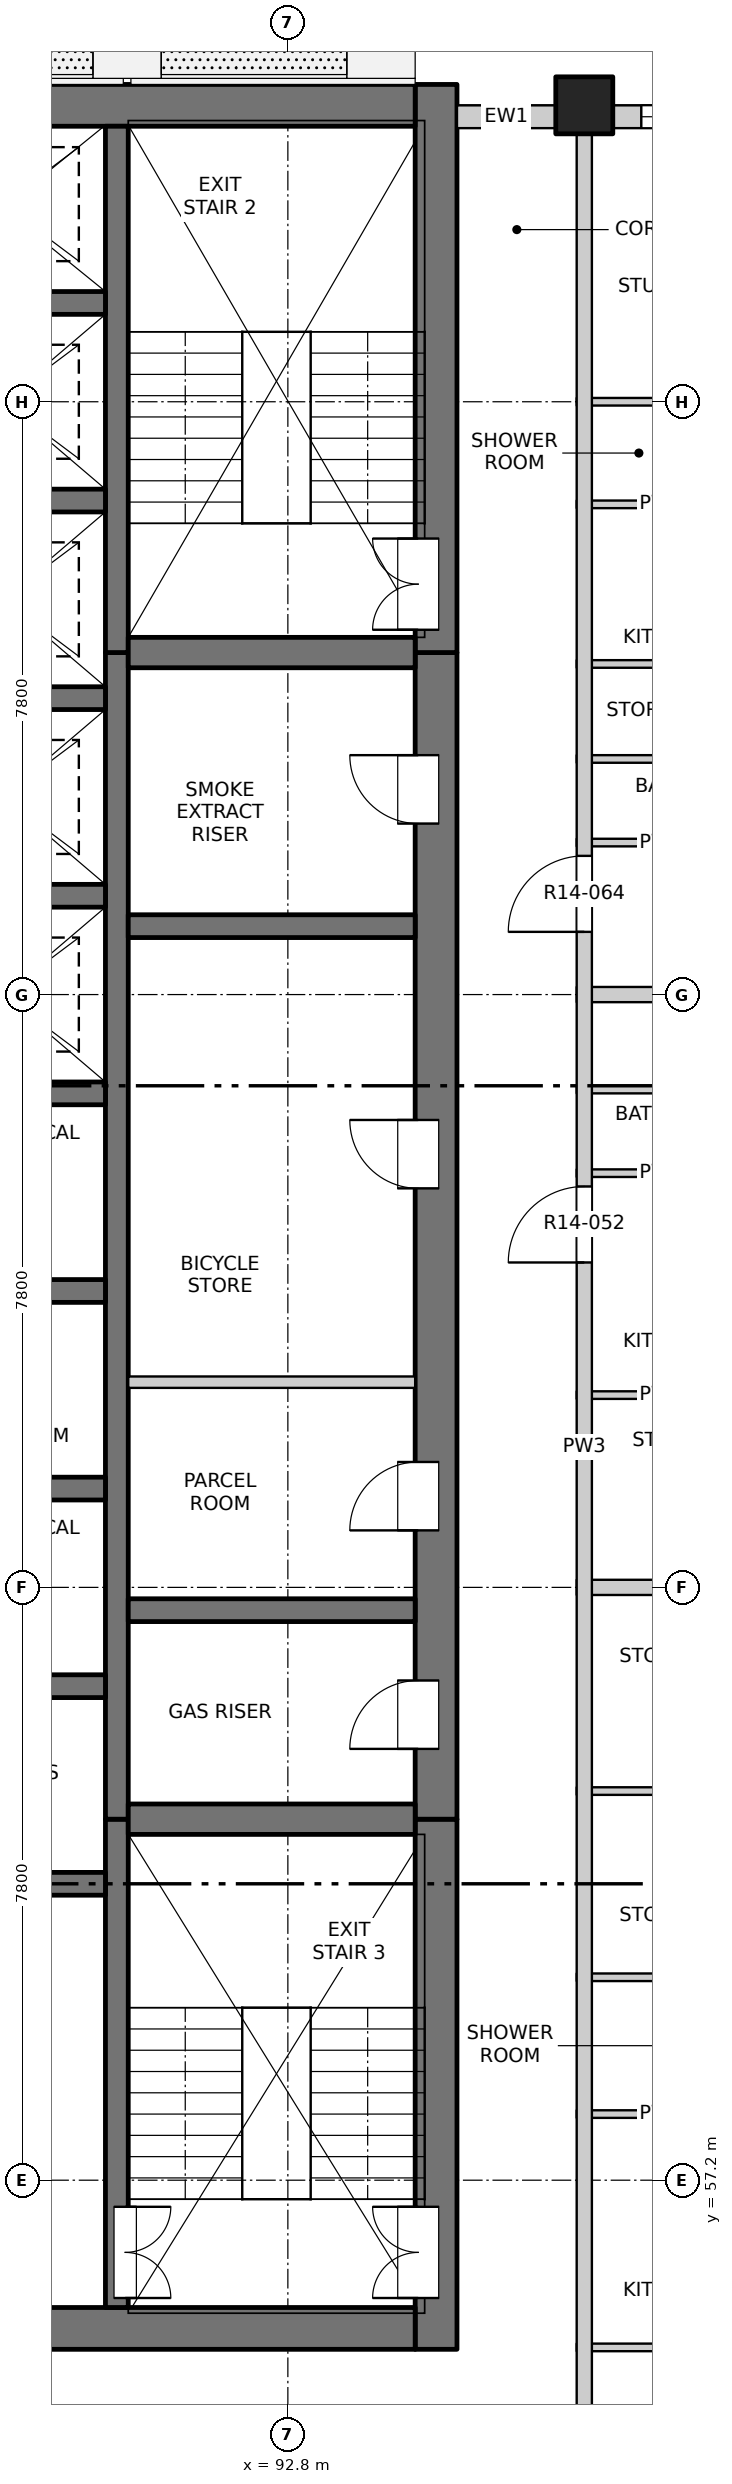
"""IFC4 building model, lengths in metres.
Left out: names, types, materials, properties, quantities, classifications, styles, units other than length and angle.
Written with IfcOpenShell. Run it as: python <this file> out.ifc"""

import sys

from ifc_helpers import new_model, si_unit, direction, frame, frame_2d, origin, origin_2d, place, context, subcontext, project, spatial, rectangle, extrude, element, fill, save


model = new_model("IFC4")
c1 = context("Model", 3, precision=1e-05, world=origin(), true_north=direction((0.0, 1.0)))
c2 = subcontext(c1, "Body", "Model", "MODEL_VIEW")
j1 = project(units=[si_unit("LENGTHUNIT", "METRE"), si_unit("PLANEANGLEUNIT", "RADIAN")], contexts=[c1])
p1 = place(None, origin())
s1 = spatial("IfcSite", under=j1, at=p1, CompositionType="ELEMENT")
p2 = place(p1, origin())
s2 = spatial("IfcBuilding", under=s1, at=p2, CompositionType="ELEMENT")
p3 = place(p2, frame((0.0, 0.0, 148.6)))
s3 = spatial("IfcBuildingStorey", under=s2, at=p3, CompositionType="ELEMENT", Elevation=148.6)
p4 = place(p3, frame((96.7, 84.5, -0.3), z_axis=(0.0, 0.0, 1.0), x_axis=(1.0, 0.0, 0.0)))
e1 = element("IfcColumn", 1, at=p4, inside=s3, PredefinedType="COLUMN", context=c2, shape_type="SweptSolid", body=[
    extrude(rectangle(XDim=0.75, YDim=0.75, at=origin_2d()), origin(), (0.0, 0.0, 1.0), 3.45),
])
p5 = place(p3, frame((94.75, 54.975, -0.3), z_axis=(0.0, 0.0, 1.0), x_axis=(0.0, 1.0, 0.0)))
e2 = element("IfcWall", 2, at=p5, inside=s3, PredefinedType="SOLIDWALL", context=c2, shape_type="SweptSolid", body=[
    extrude(rectangle(XDim=6.975, YDim=0.55, at=frame_2d((3.487, 0.0))), origin(), (0.0, 0.0, 1.0), 3.45),
])
p6 = place(p5, frame((0.675, 0.0, 0.3)))
e3 = element("IfcOpeningElement", 3, at=p6, cuts=e2, PredefinedType="OPENING", context=c2, shape_type="SweptSolid", body=[
    extrude(rectangle(XDim=1.2, YDim=2.1, at=frame_2d((0.6, 1.05))), frame((0.0, 0.285, 0.0), z_axis=(0.0, -1.0, 0.0), x_axis=(1.0, 0.0, 0.0)), (0.0, 0.0, 1.0), 0.57),
])
p7 = place(p3, frame((94.75, 61.95, -0.3), z_axis=(0.0, 0.0, 1.0), x_axis=(0.0, 1.0, 0.0)))
e4 = element("IfcWall", 4, at=p7, inside=s3, PredefinedType="SOLIDWALL", context=c2, shape_type="SweptSolid", body=[
    extrude(rectangle(XDim=15.35, YDim=0.55, at=frame_2d((7.675, 0.0))), origin(), (0.0, 0.0, 1.0), 3.45),
])
p8 = place(p7, frame((0.925, 0.0, 0.3)))
e5 = element("IfcOpeningElement", 5, at=p8, cuts=e4, PredefinedType="OPENING", context=c2, shape_type="SweptSolid", body=[
    extrude(rectangle(XDim=0.9, YDim=2.1, at=frame_2d((0.45, 1.05))), frame((0.0, 0.285, 0.0), z_axis=(0.0, -1.0, 0.0), x_axis=(1.0, 0.0, 0.0)), (0.0, 0.0, 1.0), 0.57),
])
p9 = place(p7, frame((3.8, 0.0, 0.3)))
e6 = element("IfcOpeningElement", 6, at=p9, cuts=e4, PredefinedType="OPENING", context=c2, shape_type="SweptSolid", body=[
    extrude(rectangle(XDim=0.9, YDim=2.1, at=frame_2d((0.45, 1.05))), frame((0.0, 0.285, 0.0), z_axis=(0.0, -1.0, 0.0), x_axis=(1.0, 0.0, 0.0)), (0.0, 0.0, 1.0), 0.57),
])
p10 = place(p7, frame((8.3, 0.0, 0.3)))
e7 = element("IfcOpeningElement", 7, at=p10, cuts=e4, PredefinedType="OPENING", context=c2, shape_type="SweptSolid", body=[
    extrude(rectangle(XDim=0.9, YDim=2.1, at=frame_2d((0.45, 1.05))), frame((0.0, 0.285, 0.0), z_axis=(0.0, -1.0, 0.0), x_axis=(1.0, 0.0, 0.0)), (0.0, 0.0, 1.0), 0.57),
])
p11 = place(p7, frame((13.1, 0.0, 0.3)))
e8 = element("IfcOpeningElement", 8, at=p11, cuts=e4, PredefinedType="OPENING", context=c2, shape_type="SweptSolid", body=[
    extrude(rectangle(XDim=0.9, YDim=2.1, at=frame_2d((0.45, 1.05))), frame((0.0, 0.285, 0.0), z_axis=(0.0, -1.0, 0.0), x_axis=(1.0, 0.0, 0.0)), (0.0, 0.0, 1.0), 0.57),
])
p12 = place(p3, frame((94.75, 77.3, -0.3), z_axis=(0.0, 0.0, 1.0), x_axis=(0.0, 1.0, 0.0)))
e9 = element("IfcWall", 9, at=p12, inside=s3, PredefinedType="SOLIDWALL", context=c2, shape_type="SweptSolid", body=[
    extrude(rectangle(XDim=7.475, YDim=0.55, at=frame_2d((3.737, 0.0))), origin(), (0.0, 0.0, 1.0), 3.45),
])
p13 = place(p12, frame((0.3, 0.0, 0.3)))
e10 = element("IfcOpeningElement", 10, at=p13, cuts=e9, PredefinedType="OPENING", context=c2, shape_type="SweptSolid", body=[
    extrude(rectangle(XDim=1.2, YDim=2.1, at=frame_2d((0.6, 1.05))), frame((0.0, 0.285, 0.0), z_axis=(0.0, -1.0, 0.0), x_axis=(1.0, 0.0, 0.0)), (0.0, 0.0, 1.0), 0.57),
])
p14 = place(p3, frame((75.525, 55.25, -0.3), z_axis=(0.0, 0.0, 1.0), x_axis=(1.0, 0.0, 0.0)))
e11 = element("IfcWall", 11, at=p14, inside=s3, PredefinedType="SOLIDWALL", context=c2, shape_type="SweptSolid", body=[
    extrude(rectangle(XDim=18.95, YDim=0.55, at=frame_2d((9.475, 0.0))), origin(), (0.0, 0.0, 1.0), 3.45),
])
p15 = place(p14, frame((8.725, 0.0, 0.3)))
e12 = element("IfcOpeningElement", 12, at=p15, cuts=e11, PredefinedType="OPENING", context=c2, shape_type="SweptSolid", body=[
    extrude(rectangle(XDim=1.5, YDim=2.1, at=frame_2d((0.75, 1.05))), frame((0.0, 0.285, 0.0), z_axis=(0.0, -1.0, 0.0), x_axis=(1.0, 0.0, 0.0)), (0.0, 0.0, 1.0), 0.57),
])
p16 = place(p3, frame((75.525, 84.5, -0.3), z_axis=(0.0, 0.0, 1.0), x_axis=(1.0, 0.0, 0.0)))
e13 = element("IfcWall", 13, at=p16, inside=s3, PredefinedType="SOLIDWALL", context=c2, shape_type="SweptSolid", body=[
    extrude(rectangle(XDim=18.95, YDim=0.55, at=frame_2d((9.475, 0.0))), origin(), (0.0, 0.0, 1.0), 3.45),
])
p17 = place(p3, frame((90.55, 55.525, -0.3), z_axis=(0.0, 0.0, 1.0), x_axis=(0.0, 1.0, 0.0)))
e14 = element("IfcWall", 14, at=p17, inside=s3, PredefinedType="SOLIDWALL", context=c2, shape_type="SweptSolid", body=[
    extrude(rectangle(XDim=6.425, YDim=0.3, at=frame_2d((3.212, 0.0))), origin(), (0.0, 0.0, 1.0), 3.45),
])
p18 = place(p17, frame((0.125, 0.0, 0.3)))
e15 = element("IfcOpeningElement", 15, at=p18, cuts=e14, PredefinedType="OPENING", context=c2, shape_type="SweptSolid", body=[
    extrude(rectangle(XDim=1.2, YDim=2.1, at=frame_2d((0.6, 1.05))), frame((0.0, 0.16, 0.0), z_axis=(0.0, -1.0, 0.0), x_axis=(1.0, 0.0, 0.0)), (0.0, 0.0, 1.0), 0.32),
])
p19 = place(p3, frame((90.55, 61.95, -0.3), z_axis=(0.0, 0.0, 1.0), x_axis=(0.0, 1.0, 0.0)))
e16 = element("IfcWall", 16, at=p19, inside=s3, PredefinedType="SOLIDWALL", context=c2, shape_type="SweptSolid", body=[
    extrude(rectangle(XDim=15.35, YDim=0.3, at=frame_2d((7.675, 0.0))), origin(), (0.0, 0.0, 1.0), 3.45),
])
p20 = place(p3, frame((90.55, 77.3, -0.3), z_axis=(0.0, 0.0, 1.0), x_axis=(0.0, 1.0, 0.0)))
e17 = element("IfcWall", 17, at=p20, inside=s3, PredefinedType="SOLIDWALL", context=c2, shape_type="SweptSolid", body=[
    extrude(rectangle(XDim=6.925, YDim=0.3, at=frame_2d((3.462, 0.0))), origin(), (0.0, 0.0, 1.0), 3.45),
])
for number, where, z_axis, x_axis in (
    (18, (87.4, 61.1, -0.3), (0.0, 0.0, 1.0), (1.0, 0.0, 0.0)),
    (19, (87.4, 63.7, -0.3), (0.0, 0.0, 1.0), (1.0, 0.0, 0.0)),
    (20, (87.4, 66.3, -0.3), (0.0, 0.0, 1.0), (1.0, 0.0, 0.0)),
    (21, (87.4, 68.9, -0.3), (0.0, 0.0, 1.0), (1.0, 0.0, 0.0)),
    (22, (87.4, 71.5, -0.3), (0.0, 0.0, 1.0), (1.0, 0.0, 0.0)),
    (23, (87.4, 74.1, -0.3), (0.0, 0.0, 1.0), (1.0, 0.0, 0.0)),
    (24, (87.4, 76.7, -0.3), (0.0, 0.0, 1.0), (1.0, 0.0, 0.0)),
    (25, (87.4, 79.3, -0.3), (0.0, 0.0, 1.0), (1.0, 0.0, 0.0)),
    (26, (87.4, 81.9, -0.3), (0.0, 0.0, 1.0), (1.0, 0.0, 0.0)),
):
    element("IfcWall", number, at=place(p3, frame(where, z_axis=z_axis, x_axis=x_axis)), inside=s3, PredefinedType="SOLIDWALL", context=c2, shape_type="SweptSolid", body=[
        extrude(rectangle(XDim=3.0, YDim=0.3, at=frame_2d((1.5, 0.0))), origin(), (0.0, 0.0, 1.0), 3.45),
    ])
p21 = place(p3, frame((90.7, 61.95, -0.3), z_axis=(0.0, 0.0, 1.0), x_axis=(1.0, 0.0, 0.0)))
e27 = element("IfcWall", 27, at=p21, inside=s3, PredefinedType="SOLIDWALL", context=c2, shape_type="SweptSolid", body=[
    extrude(rectangle(XDim=3.775, YDim=0.4, at=frame_2d((1.888, 0.0))), origin(), (0.0, 0.0, 1.0), 3.45),
])
for number, where, z_axis, x_axis in (
    (28, (90.7, 64.7, -0.3), (0.0, 0.0, 1.0), (1.0, 0.0, 0.0)),
    (29, (90.7, 73.7, -0.3), (0.0, 0.0, 1.0), (1.0, 0.0, 0.0)),
):
    element("IfcWall", number, at=place(p3, frame(where, z_axis=z_axis, x_axis=x_axis)), inside=s3, PredefinedType="SOLIDWALL", context=c2, shape_type="SweptSolid", body=[
        extrude(rectangle(XDim=3.775, YDim=0.3, at=frame_2d((1.888, 0.0))), origin(), (0.0, 0.0, 1.0), 3.45),
    ])
p22 = place(p3, frame((90.7, 77.3, -0.3), z_axis=(0.0, 0.0, 1.0), x_axis=(1.0, 0.0, 0.0)))
e30 = element("IfcWall", 30, at=p22, inside=s3, PredefinedType="SOLIDWALL", context=c2, shape_type="SweptSolid", body=[
    extrude(rectangle(XDim=3.775, YDim=0.4, at=frame_2d((1.888, 0.0))), origin(), (0.0, 0.0, 1.0), 3.45),
])
p23 = place(p3, frame((95.025, 84.35, 0.0), z_axis=(0.0, 0.0, 1.0), x_axis=(1.0, 0.0, 0.0)))
e31 = element("IfcWall", 31, at=p23, inside=s3, PredefinedType="SOLIDWALL", context=c2, shape_type="SweptSolid", body=[
    extrude(rectangle(XDim=1.3, YDim=0.3, at=frame_2d((0.65, 0.0))), origin(), (0.0, 0.0, 1.0), 2.7),
])
p24 = place(p3, frame((97.075, 84.35, 0.0), z_axis=(0.0, 0.0, 1.0), x_axis=(1.0, 0.0, 0.0)))
e32 = element("IfcWall", 32, at=p24, inside=s3, PredefinedType="SOLIDWALL", context=c2, shape_type="SweptSolid", body=[
    extrude(rectangle(XDim=3.525, YDim=0.3, at=frame_2d((1.763, 0.0))), origin(), (0.0, 0.0, 1.0), 2.7),
])
p25 = place(p24, frame((0.375, 0.0, 0.9)))
e33 = element("IfcOpeningElement", 33, at=p25, cuts=e32, PredefinedType="OPENING", context=c2, shape_type="SweptSolid", body=[
    extrude(rectangle(XDim=2.4, YDim=1.8, at=frame_2d((1.2, 0.9))), frame((0.0, 0.16, 0.0), z_axis=(0.0, -1.0, 0.0), x_axis=(1.0, 0.0, 0.0)), (0.0, 0.0, 1.0), 0.32),
])
for number, where, z_axis, x_axis in (
    (34, (96.6, 55.0, 0.0), (0.0, 0.0, 1.0), (1.0, 0.0, 0.0)),
    (35, (96.6, 58.07, 0.0), (0.0, 0.0, 1.0), (1.0, 0.0, 0.0)),
    (36, (96.6, 59.87, 0.0), (0.0, 0.0, 1.0), (1.0, 0.0, 0.0)),
    (37, (96.6, 62.32, 0.0), (0.0, 0.0, 1.0), (1.0, 0.0, 0.0)),
):
    element("IfcWall", number, at=place(p3, frame(where, z_axis=z_axis, x_axis=x_axis)), inside=s3, PredefinedType="PARTITIONING", context=c2, shape_type="SweptSolid", body=[
        extrude(rectangle(XDim=2.22, YDim=0.1, at=frame_2d((1.11, 0.0))), origin(), (0.0, 0.0, 1.0), 3.15),
    ])
p26 = place(p3, frame((96.6, 65.0, 0.0), z_axis=(0.0, 0.0, 1.0), x_axis=(1.0, 0.0, 0.0)))
e38 = element("IfcWall", 38, at=p26, inside=s3, PredefinedType="PARTITIONING", context=c2, shape_type="SweptSolid", body=[
    extrude(rectangle(XDim=7.6, YDim=0.2, at=frame_2d((3.8, 0.0))), origin(), (0.0, 0.0, 1.0), 3.15),
])
p27 = place(p3, frame((96.6, 67.53, 0.0), z_axis=(0.0, 0.0, 1.0), x_axis=(1.0, 0.0, 0.0)))
e39 = element("IfcWall", 39, at=p27, inside=s3, PredefinedType="PARTITIONING", context=c2, shape_type="SweptSolid", body=[
    extrude(rectangle(XDim=2.22, YDim=0.1, at=frame_2d((1.11, 0.0))), origin(), (0.0, 0.0, 1.0), 3.15),
])
p28 = place(p3, frame((90.7, 67.7, 0.0), z_axis=(0.0, 0.0, 1.0), x_axis=(1.0, 0.0, 0.0)))
e40 = element("IfcWall", 40, at=p28, inside=s3, PredefinedType="PARTITIONING", context=c2, shape_type="SweptSolid", body=[
    extrude(rectangle(XDim=3.775, YDim=0.15, at=frame_2d((1.887, 0.0))), origin(), (0.0, 0.0, 1.0), 3.15),
])
for number, where, z_axis, x_axis in (
    (41, (96.6, 70.45, 0.0), (0.0, 0.0, 1.0), (1.0, 0.0, 0.0)),
    (42, (96.6, 71.55, 0.0), (0.0, 0.0, 1.0), (1.0, 0.0, 0.0)),
):
    element("IfcWall", number, at=place(p3, frame(where, z_axis=z_axis, x_axis=x_axis)), inside=s3, PredefinedType="PARTITIONING", context=c2, shape_type="SweptSolid", body=[
        extrude(rectangle(XDim=2.22, YDim=0.1, at=frame_2d((1.11, 0.0))), origin(), (0.0, 0.0, 1.0), 3.15),
    ])
p29 = place(p3, frame((96.6, 72.8, 0.0), z_axis=(0.0, 0.0, 1.0), x_axis=(1.0, 0.0, 0.0)))
e43 = element("IfcWall", 43, at=p29, inside=s3, PredefinedType="PARTITIONING", context=c2, shape_type="SweptSolid", body=[
    extrude(rectangle(XDim=7.6, YDim=0.2, at=frame_2d((3.8, 0.0))), origin(), (0.0, 0.0, 1.0), 3.15),
])
for number, where, z_axis, x_axis in (
    (44, (96.6, 74.8, 0.0), (0.0, 0.0, 1.0), (1.0, 0.0, 0.0)),
    (45, (96.6, 75.9, 0.0), (0.0, 0.0, 1.0), (1.0, 0.0, 0.0)),
    (46, (96.6, 77.15, 0.0), (0.0, 0.0, 1.0), (1.0, 0.0, 0.0)),
    (47, (96.6, 79.25, 0.0), (0.0, 0.0, 1.0), (1.0, 0.0, 0.0)),
):
    element("IfcWall", number, at=place(p3, frame(where, z_axis=z_axis, x_axis=x_axis)), inside=s3, PredefinedType="PARTITIONING", context=c2, shape_type="SweptSolid", body=[
        extrude(rectangle(XDim=2.22, YDim=0.1, at=frame_2d((1.11, 0.0))), origin(), (0.0, 0.0, 1.0), 3.15),
    ])
p30 = place(p3, frame((96.6, 80.6, 0.0), z_axis=(0.0, 0.0, 1.0), x_axis=(1.0, 0.0, 0.0)))
e48 = element("IfcWall", 48, at=p30, inside=s3, PredefinedType="PARTITIONING", context=c2, shape_type="SweptSolid", body=[
    extrude(rectangle(XDim=7.6, YDim=0.1, at=frame_2d((3.8, 0.0))), origin(), (0.0, 0.0, 1.0), 3.15),
])
p31 = place(p30, frame((2.56, 0.0, 0.0)))
e49 = element("IfcOpeningElement", 49, at=p31, cuts=e48, PredefinedType="OPENING", context=c2, shape_type="SweptSolid", body=[
    extrude(rectangle(XDim=0.9, YDim=2.1, at=frame_2d((0.45, 1.05))), frame((0.0, 0.06, 0.0), z_axis=(0.0, -1.0, 0.0), x_axis=(1.0, 0.0, 0.0)), (0.0, 0.0, 1.0), 0.12),
])
p32 = place(p3, frame((96.7, 49.5, 0.0), z_axis=(0.0, 0.0, 1.0), x_axis=(0.0, 1.0, 0.0)))
e50 = element("IfcWall", 50, at=p32, inside=s3, PredefinedType="PARTITIONING", context=c2, shape_type="SweptSolid", body=[
    extrude(rectangle(XDim=34.7, YDim=0.2, at=frame_2d((17.35, 0.0))), origin(), (0.0, 0.0, 1.0), 3.15),
])
p33 = place(p32, frame((3.225, 0.0, 0.0)))
e51 = element("IfcOpeningElement", 51, at=p33, cuts=e50, PredefinedType="OPENING", context=c2, shape_type="SweptSolid", body=[
    extrude(rectangle(XDim=1.0, YDim=2.1, at=frame_2d((0.5, 1.05))), frame((0.0, 0.11, 0.0), z_axis=(0.0, -1.0, 0.0), x_axis=(1.0, 0.0, 0.0)), (0.0, 0.0, 1.0), 0.22),
])
p34 = place(p32, frame((19.775, 0.0, 0.0)))
e52 = element("IfcOpeningElement", 52, at=p34, cuts=e50, PredefinedType="OPENING", context=c2, shape_type="SweptSolid", body=[
    extrude(rectangle(XDim=1.0, YDim=2.1, at=frame_2d((0.5, 1.05))), frame((0.0, 0.11, 0.0), z_axis=(0.0, -1.0, 0.0), x_axis=(1.0, 0.0, 0.0)), (0.0, 0.0, 1.0), 0.22),
])
p35 = place(p32, frame((24.125, 0.0, 0.0)))
e53 = element("IfcOpeningElement", 53, at=p35, cuts=e50, PredefinedType="OPENING", context=c2, shape_type="SweptSolid", body=[
    extrude(rectangle(XDim=1.0, YDim=2.1, at=frame_2d((0.5, 1.05))), frame((0.0, 0.11, 0.0), z_axis=(0.0, -1.0, 0.0), x_axis=(1.0, 0.0, 0.0)), (0.0, 0.0, 1.0), 0.22),
])
p36 = place(p25, origin())
e54 = element("IfcWindow", 54, at=p36, inside=s3, PartitioningType="DOUBLE_PANEL_VERTICAL", PredefinedType="WINDOW", context=c2, shape_type="SweptSolid", body=[
    extrude(rectangle(XDim=2.4, YDim=1.8, at=frame_2d((1.2, 0.9))), frame((0.0, 0.03, 0.0), z_axis=(0.0, -1.0, 0.0), x_axis=(1.0, 0.0, 0.0)), (0.0, 0.0, 1.0), 0.06),
])
fill(e33, e54)
p37 = place(p18, origin())
e55 = element("IfcDoor", 55, at=p37, inside=s3, OperationType="DOUBLE_DOOR_SINGLE_SWING", PredefinedType="DOOR", context=c2, shape_type="SweptSolid", body=[
    extrude(rectangle(XDim=1.2, YDim=2.1, at=frame_2d((0.6, 1.05))), frame((0.0, -0.085, 0.0), z_axis=(0.0, -1.0, 0.0), x_axis=(1.0, 0.0, 0.0)), (0.0, 0.0, 1.0), 0.05),
])
fill(e15, e55)
p38 = place(p6, origin())
e56 = element("IfcDoor", 56, at=p38, inside=s3, OperationType="DOUBLE_DOOR_SINGLE_SWING", PredefinedType="DOOR", context=c2, shape_type="SweptSolid", body=[
    extrude(rectangle(XDim=1.2, YDim=2.1, at=frame_2d((0.6, 1.05))), frame((0.0, 0.26, 0.0), z_axis=(0.0, -1.0, 0.0), x_axis=(1.0, 0.0, 0.0)), (0.0, 0.0, 1.0), 0.05),
])
fill(e3, e56)
p39 = place(p8, origin())
e57 = element("IfcDoor", 57, at=p39, inside=s3, OperationType="SINGLE_SWING_LEFT", PredefinedType="DOOR", context=c2, shape_type="SweptSolid", body=[
    extrude(rectangle(XDim=0.9, YDim=2.1, at=frame_2d((0.45, 1.05))), frame((0.0, 0.26, 0.0), z_axis=(0.0, -1.0, 0.0), x_axis=(1.0, 0.0, 0.0)), (0.0, 0.0, 1.0), 0.05),
])
fill(e5, e57)
p40 = place(p9, origin())
e58 = element("IfcDoor", 58, at=p40, inside=s3, OperationType="SINGLE_SWING_LEFT", PredefinedType="DOOR", context=c2, shape_type="SweptSolid", body=[
    extrude(rectangle(XDim=0.9, YDim=2.1, at=frame_2d((0.45, 1.05))), frame((0.0, 0.26, 0.0), z_axis=(0.0, -1.0, 0.0), x_axis=(1.0, 0.0, 0.0)), (0.0, 0.0, 1.0), 0.05),
])
fill(e6, e58)
p41 = place(p34, origin())
e59 = element("IfcDoor", 59, at=p41, inside=s3, OperationType="SINGLE_SWING_RIGHT", PredefinedType="DOOR", context=c2, shape_type="SweptSolid", body=[
    extrude(rectangle(XDim=1.0, YDim=2.1, at=frame_2d((0.5, 1.05))), frame((0.0, 0.025, 0.0), z_axis=(0.0, -1.0, 0.0), x_axis=(1.0, 0.0, 0.0)), (0.0, 0.0, 1.0), 0.05),
])
fill(e52, e59)
p42 = place(p10, origin())
e60 = element("IfcDoor", 60, at=p42, inside=s3, OperationType="SINGLE_SWING_RIGHT", PredefinedType="DOOR", context=c2, shape_type="SweptSolid", body=[
    extrude(rectangle(XDim=0.9, YDim=2.1, at=frame_2d((0.45, 1.05))), frame((0.0, 0.26, 0.0), z_axis=(0.0, -1.0, 0.0), x_axis=(1.0, 0.0, 0.0)), (0.0, 0.0, 1.0), 0.05),
])
fill(e7, e60)
p43 = place(p35, origin())
e61 = element("IfcDoor", 61, at=p43, inside=s3, OperationType="SINGLE_SWING_RIGHT", PredefinedType="DOOR", context=c2, shape_type="SweptSolid", body=[
    extrude(rectangle(XDim=1.0, YDim=2.1, at=frame_2d((0.5, 1.05))), frame((0.0, 0.025, 0.0), z_axis=(0.0, -1.0, 0.0), x_axis=(1.0, 0.0, 0.0)), (0.0, 0.0, 1.0), 0.05),
])
fill(e53, e61)
p44 = place(p11, origin())
e62 = element("IfcDoor", 62, at=p44, inside=s3, OperationType="SINGLE_SWING_RIGHT", PredefinedType="DOOR", context=c2, shape_type="SweptSolid", body=[
    extrude(rectangle(XDim=0.9, YDim=2.1, at=frame_2d((0.45, 1.05))), frame((0.0, 0.26, 0.0), z_axis=(0.0, -1.0, 0.0), x_axis=(1.0, 0.0, 0.0)), (0.0, 0.0, 1.0), 0.05),
])
fill(e8, e62)
p45 = place(p13, origin())
e63 = element("IfcDoor", 63, at=p45, inside=s3, OperationType="DOUBLE_DOOR_SINGLE_SWING", PredefinedType="DOOR", context=c2, shape_type="SweptSolid", body=[
    extrude(rectangle(XDim=1.2, YDim=2.1, at=frame_2d((0.6, 1.05))), frame((0.0, 0.26, 0.0), z_axis=(0.0, -1.0, 0.0), x_axis=(1.0, 0.0, 0.0)), (0.0, 0.0, 1.0), 0.05),
])
fill(e10, e63)
save(model, sys.argv[1])
